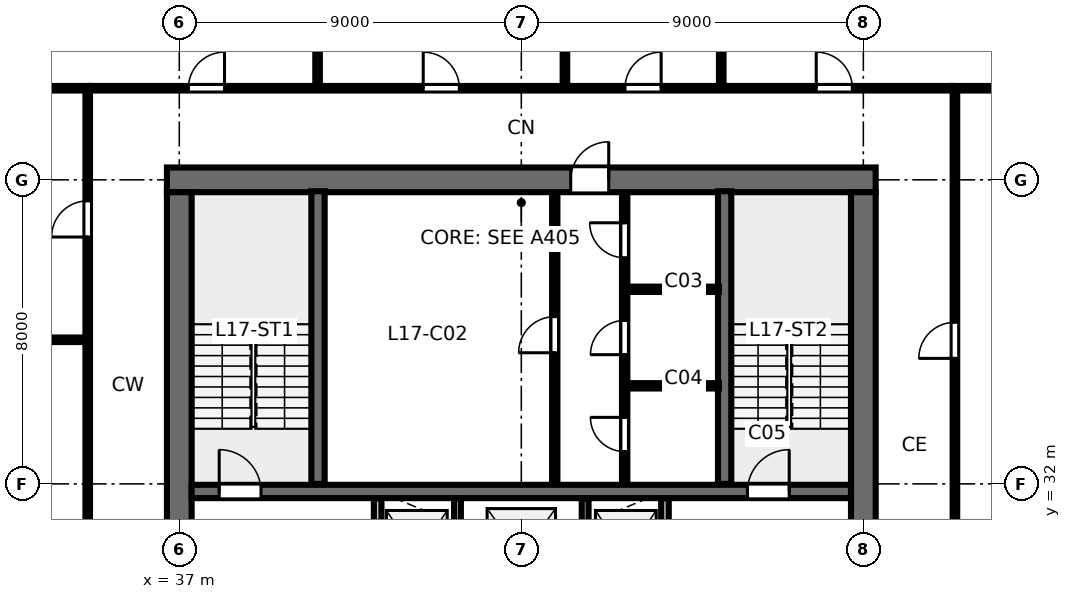
"""IFC4 building model, lengths in metres.
Left out: names, types, materials, properties, quantities, classifications, styles, units other than length and angle.
Written with IfcOpenShell. Run it as: python <this file> out.ifc"""

import sys

from ifc_helpers import new_model, si_unit, direction, frame, frame_2d, origin, place, context, subcontext, project, spatial, rectangle, extrude, element, fill, save


model = new_model("IFC4")
c1 = context("Model", 3, precision=1e-05, world=origin(), true_north=direction((0.0, 1.0)))
c2 = subcontext(c1, "Body", "Model", "MODEL_VIEW")
j1 = project(units=[si_unit("LENGTHUNIT", "METRE"), si_unit("PLANEANGLEUNIT", "RADIAN")], contexts=[c1])
p1 = place(None, origin())
s1 = spatial("IfcSite", under=j1, at=p1, CompositionType="ELEMENT")
p2 = place(p1, origin())
s2 = spatial("IfcBuilding", under=s1, at=p2, CompositionType="ELEMENT")
p3 = place(p2, frame((0.0, 0.0, 67.6)))
s3 = spatial("IfcBuildingStorey", under=s2, at=p3, CompositionType="ELEMENT", Elevation=67.6)
p4 = place(p3, frame((36.675, 40.0, 0.0), z_axis=(0.0, 0.0, 1.0), x_axis=(1.0, 0.0, 0.0)))
e1 = element("IfcWall", 1, at=p4, inside=s3, PredefinedType="SHEAR", context=c2, shape_type="SweptSolid", body=[
    extrude(rectangle(XDim=18.65, YDim=0.65, at=frame_2d((9.325, 0.0))), origin(), (0.0, 0.0, 1.0), 3.36),
])
p5 = place(p4, frame((10.625, 0.0, 0.0)))
e2 = element("IfcOpeningElement", 2, at=p5, cuts=e1, PredefinedType="OPENING", context=c2, shape_type="SweptSolid", body=[
    extrude(rectangle(XDim=1.0, YDim=2.15, at=frame_2d((0.5, 1.075))), frame((0.0, 0.335, 0.0), z_axis=(0.0, -1.0, 0.0), x_axis=(1.0, 0.0, 0.0)), (0.0, 0.0, 1.0), 0.67),
])
p6 = place(p3, frame((37.0, 24.325, 0.0), z_axis=(0.0, 0.0, 1.0), x_axis=(0.0, 1.0, 0.0)))
e3 = element("IfcWall", 3, at=p6, inside=s3, PredefinedType="SHEAR", context=c2, shape_type="SweptSolid", body=[
    extrude(rectangle(XDim=15.35, YDim=0.65, at=frame_2d((7.675, 0.0))), origin(), (0.0, 0.0, 1.0), 3.36),
])
p7 = place(p6, frame((5.2, 0.0, 0.0)))
e4 = element("IfcOpeningElement", 4, at=p7, cuts=e3, PredefinedType="OPENING", context=c2, shape_type="SweptSolid", body=[
    extrude(rectangle(XDim=1.15, YDim=2.15, at=frame_2d((0.575, 1.075))), frame((0.0, 0.335, 0.0), z_axis=(0.0, -1.0, 0.0), x_axis=(1.0, 0.0, 0.0)), (0.0, 0.0, 1.0), 0.67),
])
p8 = place(p3, frame((55.0, 24.325, 0.0), z_axis=(0.0, 0.0, 1.0), x_axis=(0.0, 1.0, 0.0)))
e5 = element("IfcWall", 5, at=p8, inside=s3, PredefinedType="SHEAR", context=c2, shape_type="SweptSolid", body=[
    extrude(rectangle(XDim=15.35, YDim=0.65, at=frame_2d((7.675, 0.0))), origin(), (0.0, 0.0, 1.0), 3.36),
])
p9 = place(p8, frame((5.2, 0.0, 0.0)))
e6 = element("IfcOpeningElement", 6, at=p9, cuts=e5, PredefinedType="OPENING", context=c2, shape_type="SweptSolid", body=[
    extrude(rectangle(XDim=1.15, YDim=2.15, at=frame_2d((0.575, 1.075))), frame((0.0, 0.335, 0.0), z_axis=(0.0, -1.0, 0.0), x_axis=(1.0, 0.0, 0.0)), (0.0, 0.0, 1.0), 0.67),
])
p10 = place(p3, frame((37.325, 31.8, 0.0), z_axis=(0.0, 0.0, 1.0), x_axis=(1.0, 0.0, 0.0)))
e7 = element("IfcWall", 7, at=p10, inside=s3, PredefinedType="SHEAR", context=c2, shape_type="SweptSolid", body=[
    extrude(rectangle(XDim=17.35, YDim=0.35, at=frame_2d((8.675, 0.0))), origin(), (0.0, 0.0, 1.0), 3.36),
])
p11 = place(p10, frame((0.725, 0.0, 0.0)))
e8 = element("IfcOpeningElement", 8, at=p11, cuts=e7, PredefinedType="OPENING", context=c2, shape_type="SweptSolid", body=[
    extrude(rectangle(XDim=1.1, YDim=2.15, at=frame_2d((0.55, 1.075))), frame((0.0, 0.185, 0.0), z_axis=(0.0, -1.0, 0.0), x_axis=(1.0, 0.0, 0.0)), (0.0, 0.0, 1.0), 0.37),
])
p12 = place(p10, frame((14.625, 0.0, 0.0)))
e9 = element("IfcOpeningElement", 9, at=p12, cuts=e7, PredefinedType="OPENING", context=c2, shape_type="SweptSolid", body=[
    extrude(rectangle(XDim=1.1, YDim=2.15, at=frame_2d((0.55, 1.075))), frame((0.0, 0.185, 0.0), z_axis=(0.0, -1.0, 0.0), x_axis=(1.0, 0.0, 0.0)), (0.0, 0.0, 1.0), 0.37),
])
for number, where, z_axis, x_axis in (
    (10, (40.65, 32.0, 0.0), (0.0, 0.0, 1.0), (0.0, 1.0, 0.0)),
    (11, (51.35, 32.0, 0.0), (0.0, 0.0, 1.0), (0.0, 1.0, 0.0)),
):
    element("IfcWall", number, at=place(p3, frame(where, z_axis=z_axis, x_axis=x_axis)), inside=s3, PredefinedType="SHEAR", context=c2, shape_type="SweptSolid", body=[
        extrude(rectangle(XDim=7.7, YDim=0.35, at=frame_2d((3.85, 0.0))), origin(), (0.0, 0.0, 1.0), 3.6),
    ])
p13 = place(p3, frame((46.88, 32.05, 0.0), z_axis=(0.0, 0.0, 1.0), x_axis=(0.0, 1.0, 0.0)))
e12 = element("IfcWall", 12, at=p13, inside=s3, PredefinedType="PARTITIONING", context=c2, shape_type="SweptSolid", body=[
    extrude(rectangle(XDim=7.6, YDim=0.14, at=frame_2d((3.8, 0.0))), origin(), (0.0, 0.0, 1.0), 3.36),
])
p14 = place(p13, frame((3.4, 0.0, 0.0)))
e13 = element("IfcOpeningElement", 13, at=p14, cuts=e12, PredefinedType="OPENING", context=c2, shape_type="SweptSolid", body=[
    extrude(rectangle(XDim=0.95, YDim=2.15, at=frame_2d((0.475, 1.075))), frame((0.0, 0.08, 0.0), z_axis=(0.0, -1.0, 0.0), x_axis=(1.0, 0.0, 0.0)), (0.0, 0.0, 1.0), 0.16),
])
p15 = place(p3, frame((48.72, 32.05, 0.0), z_axis=(0.0, 0.0, 1.0), x_axis=(0.0, 1.0, 0.0)))
e14 = element("IfcWall", 14, at=p15, inside=s3, PredefinedType="PARTITIONING", context=c2, shape_type="SweptSolid", body=[
    extrude(rectangle(XDim=7.6, YDim=0.14, at=frame_2d((3.8, 0.0))), origin(), (0.0, 0.0, 1.0), 3.36),
])
p16 = place(p15, frame((0.8, 0.0, 0.0)))
e15 = element("IfcOpeningElement", 15, at=p16, cuts=e14, PredefinedType="OPENING", context=c2, shape_type="SweptSolid", body=[
    extrude(rectangle(XDim=0.9, YDim=2.15, at=frame_2d((0.45, 1.075))), frame((0.0, 0.08, 0.0), z_axis=(0.0, -1.0, 0.0), x_axis=(1.0, 0.0, 0.0)), (0.0, 0.0, 1.0), 0.16),
])
p17 = place(p15, frame((3.35, 0.0, 0.0)))
e16 = element("IfcOpeningElement", 16, at=p17, cuts=e14, PredefinedType="OPENING", context=c2, shape_type="SweptSolid", body=[
    extrude(rectangle(XDim=0.9, YDim=2.15, at=frame_2d((0.45, 1.075))), frame((0.0, 0.08, 0.0), z_axis=(0.0, -1.0, 0.0), x_axis=(1.0, 0.0, 0.0)), (0.0, 0.0, 1.0), 0.16),
])
p18 = place(p15, frame((5.9, 0.0, 0.0)))
e17 = element("IfcOpeningElement", 17, at=p18, cuts=e14, PredefinedType="OPENING", context=c2, shape_type="SweptSolid", body=[
    extrude(rectangle(XDim=0.92, YDim=2.15, at=frame_2d((0.46, 1.075))), frame((0.0, 0.08, 0.0), z_axis=(0.0, -1.0, 0.0), x_axis=(1.0, 0.0, 0.0)), (0.0, 0.0, 1.0), 0.16),
])
for number, where, z_axis, x_axis in (
    (18, (48.8, 34.58, 0.0), (0.0, 0.0, 1.0), (1.0, 0.0, 0.0)),
    (19, (48.8, 37.12, 0.0), (0.0, 0.0, 1.0), (1.0, 0.0, 0.0)),
):
    element("IfcWall", number, at=place(p3, frame(where, z_axis=z_axis, x_axis=x_axis)), inside=s3, PredefinedType="PARTITIONING", context=c2, shape_type="SweptSolid", body=[
        extrude(rectangle(XDim=2.4, YDim=0.14, at=frame_2d((1.2, 0.0))), origin(), (0.0, 0.0, 1.0), 3.36),
    ])
p19 = place(p3, frame((42.22, 28.58, 0.0), z_axis=(0.0, 0.0, 1.0), x_axis=(0.0, 1.0, 0.0)))
e20 = element("IfcWall", 20, at=p19, inside=s3, PredefinedType="PARTITIONING", context=c2, shape_type="SweptSolid", body=[
    extrude(rectangle(XDim=3.04, YDim=0.2, at=frame_2d((1.52, 0.0))), origin(), (0.0, 0.0, 1.0), 3.36),
])
p20 = place(p19, frame((0.95, 0.0, 0.0)))
e21 = element("IfcOpeningElement", 21, at=p20, cuts=e20, PredefinedType="OPENING", context=c2, shape_type="SweptSolid", body=[
    extrude(rectangle(XDim=1.05, YDim=2.15, at=frame_2d((0.525, 1.075))), frame((0.0, 0.11, 0.0), z_axis=(0.0, -1.0, 0.0), x_axis=(1.0, 0.0, 0.0)), (0.0, 0.0, 1.0), 0.22),
])
p21 = place(p3, frame((49.78, 28.58, 0.0), z_axis=(0.0, 0.0, 1.0), x_axis=(0.0, 1.0, 0.0)))
e22 = element("IfcWall", 22, at=p21, inside=s3, PredefinedType="PARTITIONING", context=c2, shape_type="SweptSolid", body=[
    extrude(rectangle(XDim=3.04, YDim=0.2, at=frame_2d((1.52, 0.0))), origin(), (0.0, 0.0, 1.0), 3.36),
])
p22 = place(p21, frame((0.95, 0.0, 0.0)))
e23 = element("IfcOpeningElement", 23, at=p22, cuts=e22, PredefinedType="OPENING", context=c2, shape_type="SweptSolid", body=[
    extrude(rectangle(XDim=1.05, YDim=2.15, at=frame_2d((0.525, 1.075))), frame((0.0, 0.11, 0.0), z_axis=(0.0, -1.0, 0.0), x_axis=(1.0, 0.0, 0.0)), (0.0, 0.0, 1.0), 0.22),
])
for number, where, z_axis, x_axis in (
    (24, (44.32, 28.58, 0.0), (0.0, 0.0, 1.0), (0.0, 1.0, 0.0)),
    (25, (47.68, 28.58, 0.0), (0.0, 0.0, 1.0), (0.0, 1.0, 0.0)),
):
    element("IfcWall", number, at=place(p3, frame(where, z_axis=z_axis, x_axis=x_axis)), inside=s3, PredefinedType="PARTITIONING", context=c2, shape_type="SweptSolid", body=[
        extrude(rectangle(XDim=3.04, YDim=0.18, at=frame_2d((1.52, 0.0))), origin(), (0.0, 0.0, 1.0), 3.36),
    ])
p23 = place(p3, frame((40.639, 42.41, 0.0), z_axis=(0.0, 0.0, 1.0), x_axis=(0.0, 1.0, 0.0)))
e26 = element("IfcWall", 26, at=p23, inside=s3, PredefinedType="PARTITIONING", context=c2, shape_type="SweptSolid", body=[
    extrude(rectangle(XDim=11.11, YDim=0.12, at=frame_2d((5.555, 0.0))), origin(), (0.0, 0.0, 1.0), 2.64),
])
p24 = place(p23, frame((1.4, 0.0, 0.0)))
e27 = element("IfcOpeningElement", 27, at=p24, cuts=e26, PredefinedType="OPENING", context=c2, shape_type="SweptSolid", body=[
    extrude(rectangle(XDim=0.9, YDim=2.15, at=frame_2d((0.45, 1.075))), frame((0.0, 0.07, 0.0), z_axis=(0.0, -1.0, 0.0), x_axis=(1.0, 0.0, 0.0)), (0.0, 0.0, 1.0), 0.14),
])
p25 = place(p3, frame((47.148, 42.41, 0.0), z_axis=(0.0, 0.0, 1.0), x_axis=(0.0, 1.0, 0.0)))
e28 = element("IfcWall", 28, at=p25, inside=s3, PredefinedType="PARTITIONING", context=c2, shape_type="SweptSolid", body=[
    extrude(rectangle(XDim=11.11, YDim=0.12, at=frame_2d((5.555, 0.0))), origin(), (0.0, 0.0, 1.0), 2.64),
])
p26 = place(p25, frame((1.4, 0.0, 0.0)))
e29 = element("IfcOpeningElement", 29, at=p26, cuts=e28, PredefinedType="OPENING", context=c2, shape_type="SweptSolid", body=[
    extrude(rectangle(XDim=0.9, YDim=2.15, at=frame_2d((0.45, 1.075))), frame((0.0, 0.07, 0.0), z_axis=(0.0, -1.0, 0.0), x_axis=(1.0, 0.0, 0.0)), (0.0, 0.0, 1.0), 0.14),
])
p27 = place(p3, frame((51.261, 42.41, 0.0), z_axis=(0.0, 0.0, 1.0), x_axis=(0.0, 1.0, 0.0)))
e30 = element("IfcWall", 30, at=p27, inside=s3, PredefinedType="PARTITIONING", context=c2, shape_type="SweptSolid", body=[
    extrude(rectangle(XDim=11.11, YDim=0.12, at=frame_2d((5.555, 0.0))), origin(), (0.0, 0.0, 1.0), 2.64),
])
p28 = place(p27, frame((1.4, 0.0, 0.0)))
e31 = element("IfcOpeningElement", 31, at=p28, cuts=e30, PredefinedType="OPENING", context=c2, shape_type="SweptSolid", body=[
    extrude(rectangle(XDim=0.9, YDim=2.15, at=frame_2d((0.45, 1.075))), frame((0.0, 0.07, 0.0), z_axis=(0.0, -1.0, 0.0), x_axis=(1.0, 0.0, 0.0)), (0.0, 0.0, 1.0), 0.14),
])
p29 = place(p3, frame((34.65, 42.41, 0.0), z_axis=(0.0, 0.0, 1.0), x_axis=(1.0, 0.0, 0.0)))
e32 = element("IfcWall", 32, at=p29, inside=s3, PredefinedType="PARTITIONING", context=c2, shape_type="SweptSolid", body=[
    extrude(rectangle(XDim=22.7, YDim=0.12, at=frame_2d((11.35, 0.0))), origin(), (0.0, 0.0, 1.0), 2.64),
])
p30 = place(p29, frame((2.59, 0.0, 0.0)))
e33 = element("IfcOpeningElement", 33, at=p30, cuts=e32, PredefinedType="OPENING", context=c2, shape_type="SweptSolid", body=[
    extrude(rectangle(XDim=0.95, YDim=2.15, at=frame_2d((0.475, 1.075))), frame((0.0, 0.07, 0.0), z_axis=(0.0, -1.0, 0.0), x_axis=(1.0, 0.0, 0.0)), (0.0, 0.0, 1.0), 0.14),
])
p31 = place(p29, frame((8.768, 0.0, 0.0)))
e34 = element("IfcOpeningElement", 34, at=p31, cuts=e32, PredefinedType="OPENING", context=c2, shape_type="SweptSolid", body=[
    extrude(rectangle(XDim=0.95, YDim=2.15, at=frame_2d((0.475, 1.075))), frame((0.0, 0.07, 0.0), z_axis=(0.0, -1.0, 0.0), x_axis=(1.0, 0.0, 0.0)), (0.0, 0.0, 1.0), 0.14),
])
p32 = place(p29, frame((14.079, 0.0, 0.0)))
e35 = element("IfcOpeningElement", 35, at=p32, cuts=e32, PredefinedType="OPENING", context=c2, shape_type="SweptSolid", body=[
    extrude(rectangle(XDim=0.95, YDim=2.15, at=frame_2d((0.475, 1.075))), frame((0.0, 0.07, 0.0), z_axis=(0.0, -1.0, 0.0), x_axis=(1.0, 0.0, 0.0)), (0.0, 0.0, 1.0), 0.14),
])
p33 = place(p29, frame((19.11, 0.0, 0.0)))
e36 = element("IfcOpeningElement", 36, at=p33, cuts=e32, PredefinedType="OPENING", context=c2, shape_type="SweptSolid", body=[
    extrude(rectangle(XDim=0.95, YDim=2.15, at=frame_2d((0.475, 1.075))), frame((0.0, 0.07, 0.0), z_axis=(0.0, -1.0, 0.0), x_axis=(1.0, 0.0, 0.0)), (0.0, 0.0, 1.0), 0.14),
])
p34 = place(p3, frame((34.59, 35.791, 0.0), z_axis=(0.0, 0.0, 1.0), x_axis=(-1.0, 0.0, 0.0)))
e37 = element("IfcWall", 37, at=p34, inside=s3, PredefinedType="PARTITIONING", context=c2, shape_type="SweptSolid", body=[
    extrude(rectangle(XDim=13.06, YDim=0.12, at=frame_2d((6.53, 0.0))), origin(), (0.0, 0.0, 1.0), 2.64),
])
p35 = place(p34, frame((1.4, 0.0, 0.0)))
e38 = element("IfcOpeningElement", 38, at=p35, cuts=e37, PredefinedType="OPENING", context=c2, shape_type="SweptSolid", body=[
    extrude(rectangle(XDim=0.9, YDim=2.15, at=frame_2d((0.45, 1.075))), frame((0.0, 0.07, 0.0), z_axis=(0.0, -1.0, 0.0), x_axis=(1.0, 0.0, 0.0)), (0.0, 0.0, 1.0), 0.14),
])
p36 = place(p3, frame((34.59, 21.65, 0.0), z_axis=(0.0, 0.0, 1.0), x_axis=(0.0, 1.0, 0.0)))
e39 = element("IfcWall", 39, at=p36, inside=s3, PredefinedType="PARTITIONING", context=c2, shape_type="SweptSolid", body=[
    extrude(rectangle(XDim=20.7, YDim=0.12, at=frame_2d((10.35, 0.0))), origin(), (0.0, 0.0, 1.0), 2.64),
])
p37 = place(p36, frame((6.696, 0.0, 0.0)))
e40 = element("IfcOpeningElement", 40, at=p37, cuts=e39, PredefinedType="OPENING", context=c2, shape_type="SweptSolid", body=[
    extrude(rectangle(XDim=0.95, YDim=2.15, at=frame_2d((0.475, 1.075))), frame((0.0, 0.07, 0.0), z_axis=(0.0, -1.0, 0.0), x_axis=(1.0, 0.0, 0.0)), (0.0, 0.0, 1.0), 0.14),
])
p38 = place(p36, frame((16.846, 0.0, 0.0)))
e41 = element("IfcOpeningElement", 41, at=p38, cuts=e39, PredefinedType="OPENING", context=c2, shape_type="SweptSolid", body=[
    extrude(rectangle(XDim=0.95, YDim=2.15, at=frame_2d((0.475, 1.075))), frame((0.0, 0.07, 0.0), z_axis=(0.0, -1.0, 0.0), x_axis=(1.0, 0.0, 0.0)), (0.0, 0.0, 1.0), 0.14),
])
p39 = place(p3, frame((57.41, 21.65, 0.0), z_axis=(0.0, 0.0, 1.0), x_axis=(0.0, 1.0, 0.0)))
e42 = element("IfcWall", 42, at=p39, inside=s3, PredefinedType="PARTITIONING", context=c2, shape_type="SweptSolid", body=[
    extrude(rectangle(XDim=20.7, YDim=0.12, at=frame_2d((10.35, 0.0))), origin(), (0.0, 0.0, 1.0), 2.64),
])
p40 = place(p39, frame((3.502, 0.0, 0.0)))
e43 = element("IfcOpeningElement", 43, at=p40, cuts=e42, PredefinedType="OPENING", context=c2, shape_type="SweptSolid", body=[
    extrude(rectangle(XDim=0.95, YDim=2.15, at=frame_2d((0.475, 1.075))), frame((0.0, 0.07, 0.0), z_axis=(0.0, -1.0, 0.0), x_axis=(1.0, 0.0, 0.0)), (0.0, 0.0, 1.0), 0.14),
])
p41 = place(p39, frame((13.652, 0.0, 0.0)))
e44 = element("IfcOpeningElement", 44, at=p41, cuts=e42, PredefinedType="OPENING", context=c2, shape_type="SweptSolid", body=[
    extrude(rectangle(XDim=0.95, YDim=2.15, at=frame_2d((0.475, 1.075))), frame((0.0, 0.07, 0.0), z_axis=(0.0, -1.0, 0.0), x_axis=(1.0, 0.0, 0.0)), (0.0, 0.0, 1.0), 0.14),
])
for number, where, z_axis, x_axis in (
    (45, (34.65, 42.41, 0.0), (0.0, 0.0, 1.0), (-1.0, 0.0, 0.0)),
    (46, (57.35, 42.41, 0.0), (0.0, 0.0, 1.0), (1.0, 0.0, 0.0)),
):
    element("IfcWall", number, at=place(p3, frame(where, z_axis=z_axis, x_axis=x_axis)), inside=s3, PredefinedType="PARTITIONING", context=c2, shape_type="SweptSolid", body=[
        extrude(rectangle(XDim=13.12, YDim=0.12, at=frame_2d((6.56, 0.0))), origin(), (0.0, 0.0, 1.0), 2.64),
    ])
p42 = place(p11, origin())
e47 = element("IfcDoor", 47, at=p42, inside=s3, OperationType="SINGLE_SWING_LEFT", PredefinedType="DOOR", context=c2, shape_type="SweptSolid", body=[
    extrude(rectangle(XDim=1.1, YDim=2.15, at=frame_2d((0.55, 1.075))), frame((0.0, 0.025, 0.0), z_axis=(0.0, -1.0, 0.0), x_axis=(1.0, 0.0, 0.0)), (0.0, 0.0, 1.0), 0.05),
])
fill(e8, e47)
p43 = place(p12, origin())
e48 = element("IfcDoor", 48, at=p43, inside=s3, OperationType="SINGLE_SWING_RIGHT", PredefinedType="DOOR", context=c2, shape_type="SweptSolid", body=[
    extrude(rectangle(XDim=1.1, YDim=2.15, at=frame_2d((0.55, 1.075))), frame((0.0, 0.025, 0.0), z_axis=(0.0, -1.0, 0.0), x_axis=(1.0, 0.0, 0.0)), (0.0, 0.0, 1.0), 0.05),
])
fill(e9, e48)
p44 = place(p5, origin())
e49 = element("IfcDoor", 49, at=p44, inside=s3, OperationType="SINGLE_SWING_RIGHT", PredefinedType="DOOR", context=c2, shape_type="SweptSolid", body=[
    extrude(rectangle(XDim=1.0, YDim=2.15, at=frame_2d((0.5, 1.075))), frame((0.0, 0.025, 0.0), z_axis=(0.0, -1.0, 0.0), x_axis=(1.0, 0.0, 0.0)), (0.0, 0.0, 1.0), 0.05),
])
fill(e2, e49)
p45 = place(p14, origin())
e50 = element("IfcDoor", 50, at=p45, inside=s3, OperationType="SINGLE_SWING_LEFT", PredefinedType="DOOR", context=c2, shape_type="SweptSolid", body=[
    extrude(rectangle(XDim=0.95, YDim=2.15, at=frame_2d((0.475, 1.075))), frame((0.0, 0.025, 0.0), z_axis=(0.0, -1.0, 0.0), x_axis=(1.0, 0.0, 0.0)), (0.0, 0.0, 1.0), 0.05),
])
fill(e13, e50)
p46 = place(p16, origin())
e51 = element("IfcDoor", 51, at=p46, inside=s3, OperationType="SINGLE_SWING_RIGHT", PredefinedType="DOOR", context=c2, shape_type="SweptSolid", body=[
    extrude(rectangle(XDim=0.9, YDim=2.15, at=frame_2d((0.45, 1.075))), frame((0.0, 0.025, 0.0), z_axis=(0.0, -1.0, 0.0), x_axis=(1.0, 0.0, 0.0)), (0.0, 0.0, 1.0), 0.05),
])
fill(e15, e51)
p47 = place(p17, origin())
e52 = element("IfcDoor", 52, at=p47, inside=s3, OperationType="SINGLE_SWING_LEFT", PredefinedType="DOOR", context=c2, shape_type="SweptSolid", body=[
    extrude(rectangle(XDim=0.9, YDim=2.15, at=frame_2d((0.45, 1.075))), frame((0.0, 0.025, 0.0), z_axis=(0.0, -1.0, 0.0), x_axis=(1.0, 0.0, 0.0)), (0.0, 0.0, 1.0), 0.05),
])
fill(e16, e52)
p48 = place(p18, origin())
e53 = element("IfcDoor", 53, at=p48, inside=s3, OperationType="SINGLE_SWING_RIGHT", PredefinedType="DOOR", context=c2, shape_type="SweptSolid", body=[
    extrude(rectangle(XDim=0.92, YDim=2.15, at=frame_2d((0.46, 1.075))), frame((0.0, 0.025, 0.0), z_axis=(0.0, -1.0, 0.0), x_axis=(1.0, 0.0, 0.0)), (0.0, 0.0, 1.0), 0.05),
])
fill(e17, e53)
p49 = place(p30, origin())
e54 = element("IfcDoor", 54, at=p49, inside=s3, OperationType="SINGLE_SWING_RIGHT", PredefinedType="DOOR", context=c2, shape_type="SweptSolid", body=[
    extrude(rectangle(XDim=0.95, YDim=2.15, at=frame_2d((0.475, 1.075))), frame((0.0, 0.025, 0.0), z_axis=(0.0, -1.0, 0.0), x_axis=(1.0, 0.0, 0.0)), (0.0, 0.0, 1.0), 0.05),
])
fill(e33, e54)
p50 = place(p31, origin())
e55 = element("IfcDoor", 55, at=p50, inside=s3, OperationType="SINGLE_SWING_LEFT", PredefinedType="DOOR", context=c2, shape_type="SweptSolid", body=[
    extrude(rectangle(XDim=0.95, YDim=2.15, at=frame_2d((0.475, 1.075))), frame((0.0, 0.025, 0.0), z_axis=(0.0, -1.0, 0.0), x_axis=(1.0, 0.0, 0.0)), (0.0, 0.0, 1.0), 0.05),
])
fill(e34, e55)
p51 = place(p32, origin())
e56 = element("IfcDoor", 56, at=p51, inside=s3, OperationType="SINGLE_SWING_RIGHT", PredefinedType="DOOR", context=c2, shape_type="SweptSolid", body=[
    extrude(rectangle(XDim=0.95, YDim=2.15, at=frame_2d((0.475, 1.075))), frame((0.0, 0.025, 0.0), z_axis=(0.0, -1.0, 0.0), x_axis=(1.0, 0.0, 0.0)), (0.0, 0.0, 1.0), 0.05),
])
fill(e35, e56)
p52 = place(p33, origin())
e57 = element("IfcDoor", 57, at=p52, inside=s3, OperationType="SINGLE_SWING_LEFT", PredefinedType="DOOR", context=c2, shape_type="SweptSolid", body=[
    extrude(rectangle(XDim=0.95, YDim=2.15, at=frame_2d((0.475, 1.075))), frame((0.0, 0.025, 0.0), z_axis=(0.0, -1.0, 0.0), x_axis=(1.0, 0.0, 0.0)), (0.0, 0.0, 1.0), 0.05),
])
fill(e36, e57)
p53 = place(p38, origin())
e58 = element("IfcDoor", 58, at=p53, inside=s3, OperationType="SINGLE_SWING_LEFT", PredefinedType="DOOR", context=c2, shape_type="SweptSolid", body=[
    extrude(rectangle(XDim=0.95, YDim=2.15, at=frame_2d((0.475, 1.075))), frame((0.0, 0.025, 0.0), z_axis=(0.0, -1.0, 0.0), x_axis=(1.0, 0.0, 0.0)), (0.0, 0.0, 1.0), 0.05),
])
fill(e41, e58)
p54 = place(p41, origin())
e59 = element("IfcDoor", 59, at=p54, inside=s3, OperationType="SINGLE_SWING_LEFT", PredefinedType="DOOR", context=c2, shape_type="SweptSolid", body=[
    extrude(rectangle(XDim=0.95, YDim=2.15, at=frame_2d((0.475, 1.075))), frame((0.0, 0.025, 0.0), z_axis=(0.0, -1.0, 0.0), x_axis=(1.0, 0.0, 0.0)), (0.0, 0.0, 1.0), 0.05),
])
fill(e44, e59)
save(model, sys.argv[1])
